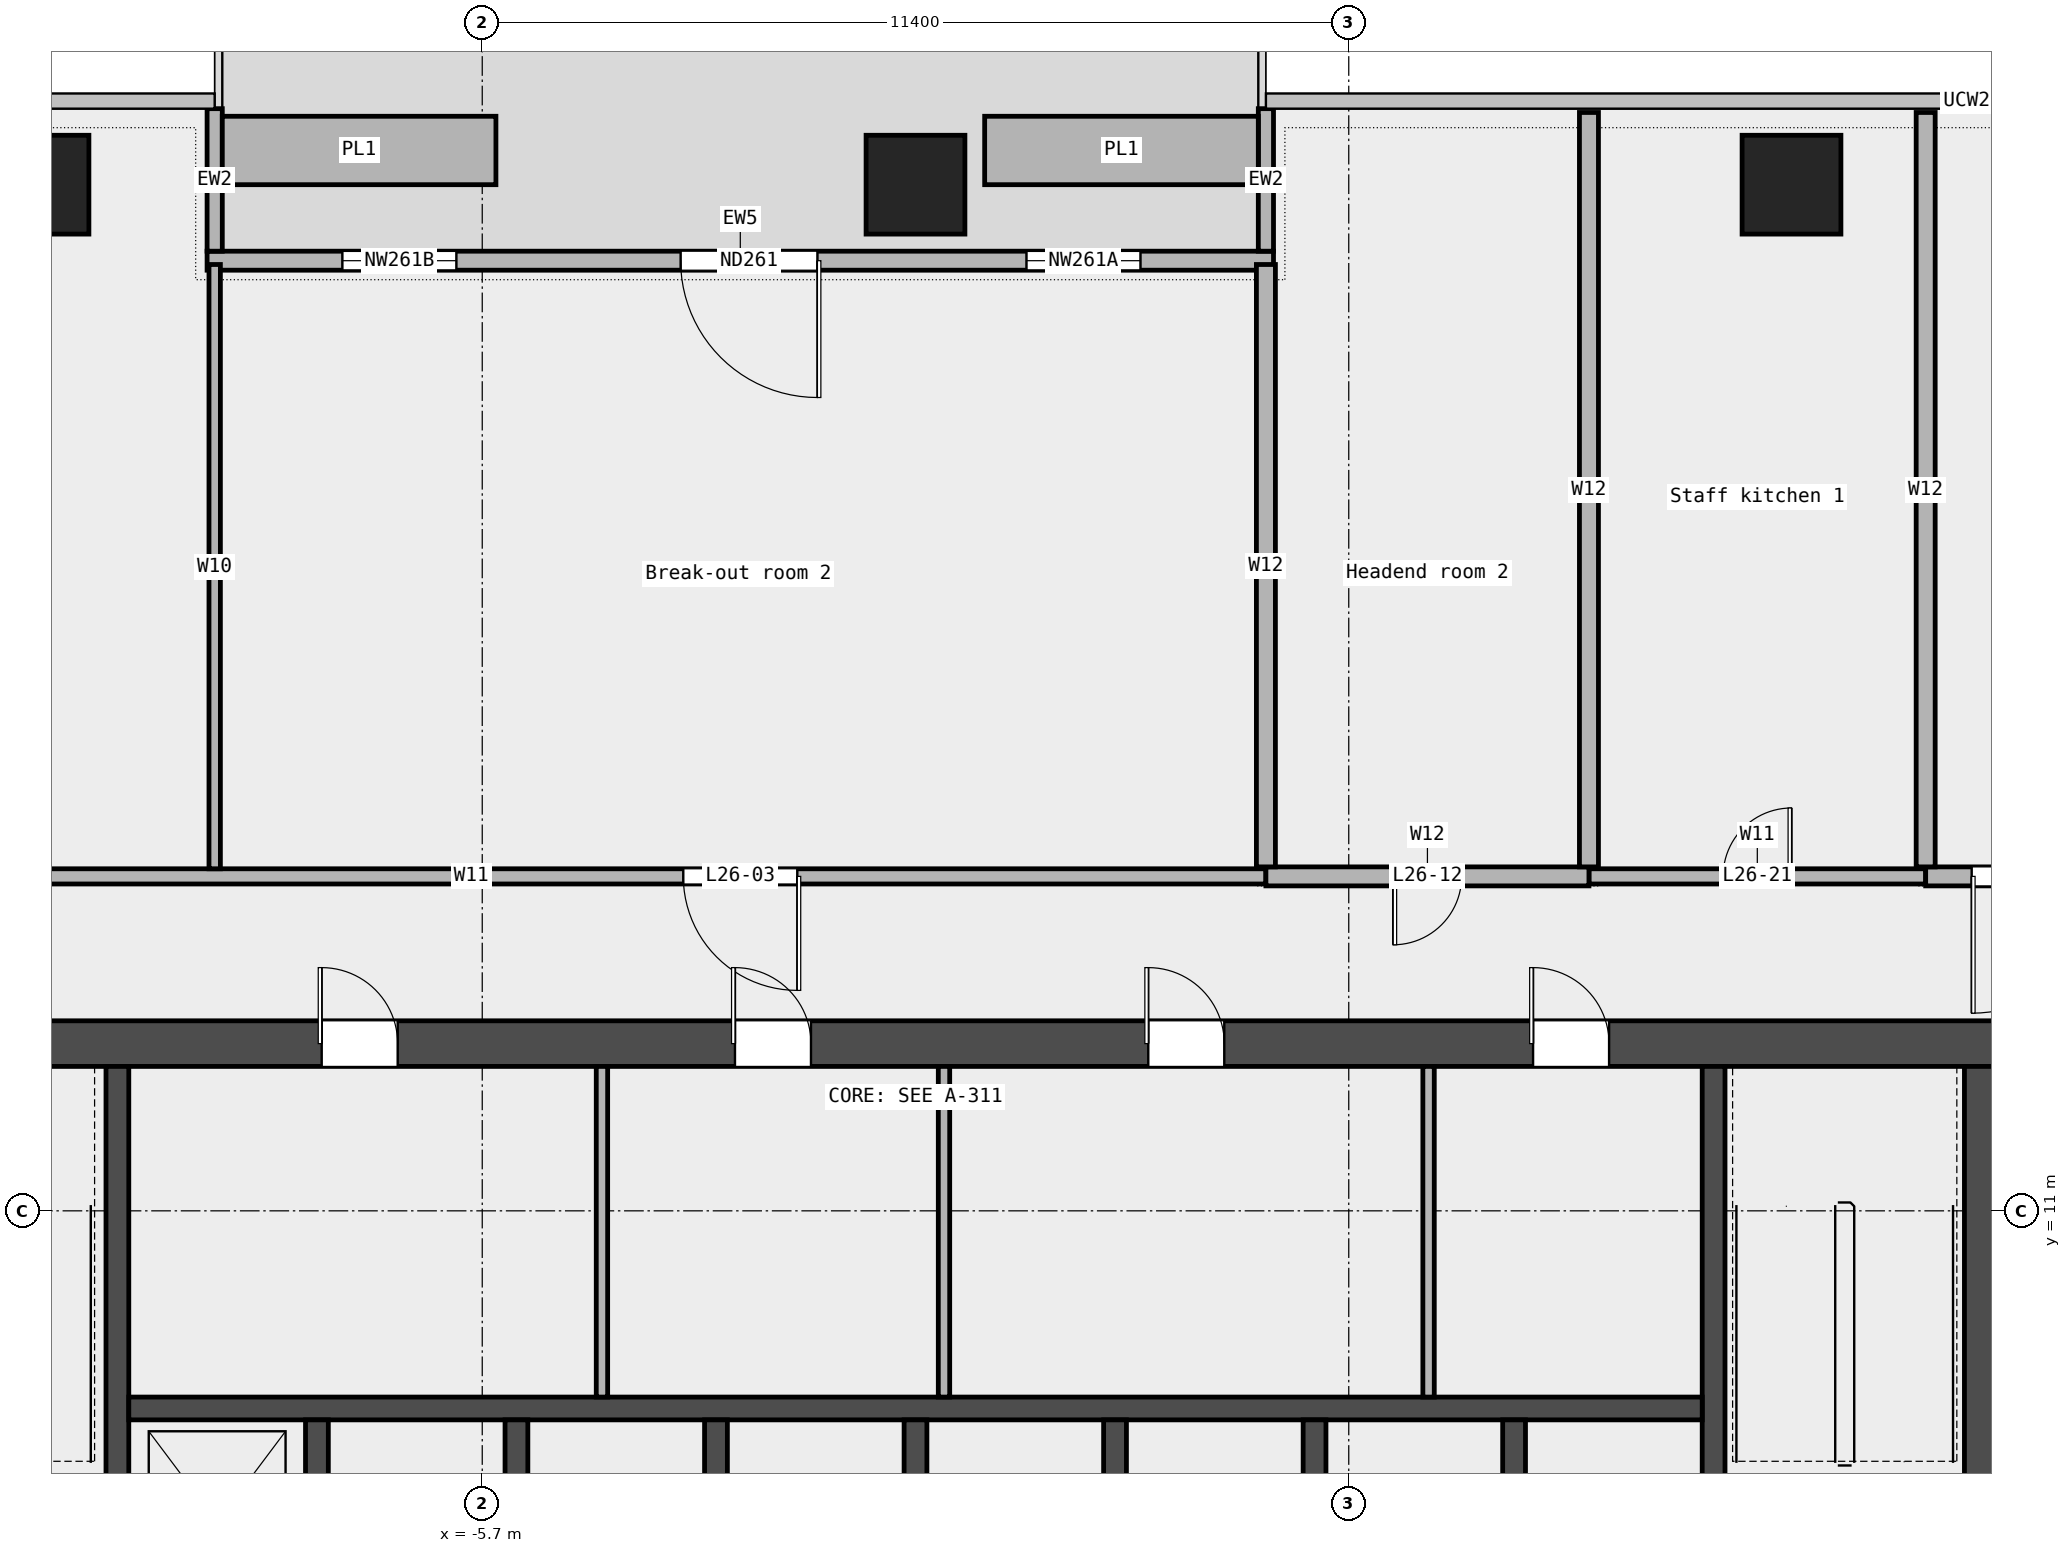
"""IFC4 building model, lengths in metres.
Left out: names, types, materials, properties, quantities, classifications, styles, units other than length and angle.
Written with IfcOpenShell. Run it as: python <this file> out.ifc"""

import sys

from ifc_helpers import new_model, si_unit, direction, frame, frame_2d, origin, origin_2d, place, context, subcontext, project, spatial, rectangle, extrude, element, fill, save


model = new_model("IFC4")
c1 = context("Model", 3, precision=1e-05, world=origin(), true_north=direction((0.0, 1.0)))
c2 = subcontext(c1, "Body", "Model", "MODEL_VIEW")
j1 = project(units=[si_unit("LENGTHUNIT", "METRE"), si_unit("PLANEANGLEUNIT", "RADIAN")], contexts=[c1])
p1 = place(None, origin())
s1 = spatial("IfcSite", under=j1, at=p1, CompositionType="ELEMENT")
p2 = place(p1, origin())
s2 = spatial("IfcBuilding", under=s1, at=p2, CompositionType="ELEMENT")
p3 = place(p2, frame((0.0, 0.0, 130.6)))
s3 = spatial("IfcBuildingStorey", under=s2, at=p3, CompositionType="ELEMENT", Elevation=130.6)
for number, where, z_axis, x_axis in (
    (1, (11.525, 24.5, 0.0), (0.0, 0.0, 1.0), (1.0, 0.0, 0.0)),
    (2, (0.0, 24.5, 0.0), (0.0, 0.0, 1.0), (1.0, 0.0, 0.0)),
    (3, (-11.525, 24.5, 0.0), (0.0, 0.0, 1.0), (1.0, 0.0, 0.0)),
):
    element("IfcColumn", number, at=place(p3, frame(where, z_axis=z_axis, x_axis=x_axis)), inside=s3, PredefinedType="COLUMN", context=c2, shape_type="SweptSolid", body=[
        extrude(rectangle(XDim=1.3, YDim=1.3, at=origin_2d()), origin(), (0.0, 0.0, 1.0), 4.05),
    ])
p4 = place(p3, frame((4.71, 23.5, 0.0), z_axis=(0.0, 0.0, 1.0), x_axis=(-1.0, 0.0, 0.0)))
e4 = element("IfcWall", 4, at=p4, inside=s3, PredefinedType="STANDARD", context=c2, shape_type="SweptSolid", body=[
    extrude(rectangle(XDim=14.03, YDim=0.25, at=frame_2d((7.015, 0.0))), origin(), (0.0, 0.0, 1.0), 4.05),
])
p5 = place(p4, frame((1.75, 0.0, 0.45)))
e5 = element("IfcOpeningElement", 5, at=p5, cuts=e4, PredefinedType="OPENING", context=c2, shape_type="SweptSolid", body=[
    extrude(rectangle(XDim=1.5, YDim=3.0, at=frame_2d((0.75, 1.5))), frame((0.0, 0.137, 0.0), z_axis=(0.0, -1.0, 0.0), x_axis=(1.0, 0.0, 0.0)), (0.0, 0.0, 1.0), 0.274),
])
p6 = place(p4, frame((6.0, 0.0, 0.0)))
e6 = element("IfcOpeningElement", 6, at=p6, cuts=e4, PredefinedType="OPENING", context=c2, shape_type="SweptSolid", body=[
    extrude(rectangle(XDim=1.8, YDim=2.4, at=frame_2d((0.9, 1.2))), frame((0.0, 0.137, 0.0), z_axis=(0.0, -1.0, 0.0), x_axis=(1.0, 0.0, 0.0)), (0.0, 0.0, 1.0), 0.274),
])
p7 = place(p4, frame((10.75, 0.0, 0.45)))
e7 = element("IfcOpeningElement", 7, at=p7, cuts=e4, PredefinedType="OPENING", context=c2, shape_type="SweptSolid", body=[
    extrude(rectangle(XDim=1.5, YDim=3.0, at=frame_2d((0.75, 1.5))), frame((0.0, 0.137, 0.0), z_axis=(0.0, -1.0, 0.0), x_axis=(1.0, 0.0, 0.0)), (0.0, 0.0, 1.0), 0.274),
])
for number, where, z_axis, x_axis in (
    (8, (4.61, 25.5, 0.0), (0.0, 0.0, 1.0), (0.0, -1.0, 0.0)),
    (9, (-9.22, 25.5, 0.0), (0.0, 0.0, 1.0), (0.0, -1.0, 0.0)),
):
    element("IfcWall", number, at=place(p3, frame(where, z_axis=z_axis, x_axis=x_axis)), inside=s3, PredefinedType="STANDARD", context=c2, shape_type="SweptSolid", body=[
        extrude(rectangle(XDim=1.875, YDim=0.2, at=frame_2d((0.938, 0.0))), origin(), (0.0, 0.0, 1.0), 4.05),
    ])
for number, where, z_axis, x_axis in (
    (10, (4.51, 24.95, 0.0), (0.0, 0.0, 1.0), (-1.0, 0.0, 0.0)),
    (11, (-5.52, 24.95, 0.0), (0.0, 0.0, 1.0), (-1.0, 0.0, 0.0)),
):
    element("IfcWall", number, at=place(p3, frame(where, z_axis=z_axis, x_axis=x_axis)), inside=s3, PredefinedType="STANDARD", context=c2, shape_type="SweptSolid", body=[
        extrude(rectangle(XDim=3.6, YDim=0.9, at=frame_2d((1.8, 0.0))), origin(), (0.0, 0.0, 1.0), 0.7),
    ])
p8 = place(p3, frame((-16.3, 15.4, 0.0), z_axis=(0.0, 0.0, 1.0), x_axis=(1.0, 0.0, 0.0)))
e12 = element("IfcWall", 12, at=p8, inside=s3, PredefinedType="PARTITIONING", context=c2, shape_type="SweptSolid", body=[
    extrude(rectangle(XDim=20.91, YDim=0.2, at=frame_2d((10.455, 0.0))), origin(), (0.0, 0.0, 1.0), 4.05),
])
p9 = place(p8, frame((13.245, 0.0, 0.0)))
e13 = element("IfcOpeningElement", 13, at=p9, cuts=e12, PredefinedType="OPENING", context=c2, shape_type="SweptSolid", body=[
    extrude(rectangle(XDim=1.5, YDim=2.1, at=frame_2d((0.75, 1.05))), frame((0.0, 0.112, 0.0), z_axis=(0.0, -1.0, 0.0), x_axis=(1.0, 0.0, 0.0)), (0.0, 0.0, 1.0), 0.224),
])
p10 = place(p8, frame((2.387, 0.0, 0.0)))
e14 = element("IfcOpeningElement", 14, at=p10, cuts=e12, PredefinedType="OPENING", context=c2, shape_type="SweptSolid", body=[
    extrude(rectangle(XDim=1.2, YDim=2.1, at=frame_2d((0.6, 1.05))), frame((0.0, 0.112, 0.0), z_axis=(0.0, -1.0, 0.0), x_axis=(1.0, 0.0, 0.0)), (0.0, 0.0, 1.0), 0.224),
])
p11 = place(p3, frame((8.86, 15.4, 0.0), z_axis=(0.0, 0.0, 1.0), x_axis=(1.0, 0.0, 0.0)))
e15 = element("IfcWall", 15, at=p11, inside=s3, PredefinedType="PARTITIONING", context=c2, shape_type="SweptSolid", body=[
    extrude(rectangle(XDim=4.43, YDim=0.2, at=frame_2d((2.215, 0.0))), origin(), (0.0, 0.0, 1.0), 4.05),
])
p12 = place(p11, frame((1.765, 0.0, 0.0)))
e16 = element("IfcOpeningElement", 16, at=p12, cuts=e15, PredefinedType="OPENING", context=c2, shape_type="SweptSolid", body=[
    extrude(rectangle(XDim=0.9, YDim=2.1, at=frame_2d((0.45, 1.05))), frame((0.0, 0.112, 0.0), z_axis=(0.0, -1.0, 0.0), x_axis=(1.0, 0.0, 0.0)), (0.0, 0.0, 1.0), 0.224),
])
p13 = place(p3, frame((4.61, 15.4, 0.0), z_axis=(0.0, 0.0, 1.0), x_axis=(1.0, 0.0, 0.0)))
e17 = element("IfcWall", 17, at=p13, inside=s3, PredefinedType="PARTITIONING", context=c2, shape_type="SweptSolid", body=[
    extrude(rectangle(XDim=4.25, YDim=0.25, at=frame_2d((2.125, 0.0))), origin(), (0.0, 0.0, 1.0), 4.05),
])
p14 = place(p13, frame((1.675, 0.0, 0.0)))
e18 = element("IfcOpeningElement", 18, at=p14, cuts=e17, PredefinedType="OPENING", context=c2, shape_type="SweptSolid", body=[
    extrude(rectangle(XDim=0.9, YDim=2.1, at=frame_2d((0.45, 1.05))), frame((0.0, 0.137, 0.0), z_axis=(0.0, -1.0, 0.0), x_axis=(1.0, 0.0, 0.0)), (0.0, 0.0, 1.0), 0.274),
])
p15 = place(p3, frame((13.29, 15.4, 0.0), z_axis=(0.0, 0.0, 1.0), x_axis=(1.0, 0.0, 0.0)))
e19 = element("IfcWall", 19, at=p15, inside=s3, PredefinedType="PARTITIONING", context=c2, shape_type="SweptSolid", body=[
    extrude(rectangle(XDim=3.01, YDim=0.25, at=frame_2d((1.505, 0.0))), origin(), (0.0, 0.0, 1.0), 4.05),
])
p16 = place(p15, frame((0.605, 0.0, 0.0)))
e20 = element("IfcOpeningElement", 20, at=p16, cuts=e19, PredefinedType="OPENING", context=c2, shape_type="SweptSolid", body=[
    extrude(rectangle(XDim=1.8, YDim=2.1, at=frame_2d((0.9, 1.05))), frame((0.0, 0.137, 0.0), z_axis=(0.0, -1.0, 0.0), x_axis=(1.0, 0.0, 0.0)), (0.0, 0.0, 1.0), 0.274),
])
p17 = place(p3, frame((-9.22, 15.5, 0.0), z_axis=(0.0, 0.0, 1.0), x_axis=(0.0, 1.0, 0.0)))
e21 = element("IfcWall", 21, at=p17, inside=s3, PredefinedType="PARTITIONING", context=c2, shape_type="SweptSolid", body=[
    extrude(rectangle(XDim=7.95, YDim=0.15, at=frame_2d((3.975, 0.0))), origin(), (0.0, 0.0, 1.0), 4.05),
])
p18 = place(p3, frame((4.61, 15.525, 0.0), z_axis=(0.0, 0.0, 1.0), x_axis=(0.0, 1.0, 0.0)))
e22 = element("IfcWall", 22, at=p18, inside=s3, PredefinedType="PARTITIONING", context=c2, shape_type="SweptSolid", body=[
    extrude(rectangle(XDim=7.925, YDim=0.25, at=frame_2d((3.962, 0.0))), origin(), (0.0, 0.0, 1.0), 4.05),
])
for number, where, z_axis, x_axis in (
    (23, (8.86, 15.525, 0.0), (0.0, 0.0, 1.0), (0.0, 1.0, 0.0)),
    (24, (13.29, 15.525, 0.0), (0.0, 0.0, 1.0), (0.0, 1.0, 0.0)),
):
    element("IfcWall", number, at=place(p3, frame(where, z_axis=z_axis, x_axis=x_axis)), inside=s3, PredefinedType="PARTITIONING", context=c2, shape_type="SweptSolid", body=[
        extrude(rectangle(XDim=9.925, YDim=0.25, at=frame_2d((4.962, 0.0))), origin(), (0.0, 0.0, 1.0), 4.05),
    ])
p19 = place(p3, frame((-14.4, 13.2, 0.0), z_axis=(0.0, 0.0, 1.0), x_axis=(1.0, 0.0, 0.0)))
e25 = element("IfcWall", 25, at=p19, inside=s3, PredefinedType="SHEAR", context=c2, shape_type="SweptSolid", body=[
    extrude(rectangle(XDim=28.8, YDim=0.6, at=frame_2d((14.4, 0.0))), origin(), (0.0, 0.0, 1.0), 4.2),
])
p20 = place(p19, frame((6.587, 0.0, 0.0)))
e26 = element("IfcOpeningElement", 26, at=p20, cuts=e25, PredefinedType="OPENING", context=c2, shape_type="SweptSolid", body=[
    extrude(rectangle(XDim=1.0, YDim=2.1, at=frame_2d((0.5, 1.05))), frame((0.0, 0.312, 0.0), z_axis=(0.0, -1.0, 0.0), x_axis=(1.0, 0.0, 0.0)), (0.0, 0.0, 1.0), 0.624),
])
p21 = place(p19, frame((12.025, 0.0, 0.0)))
e27 = element("IfcOpeningElement", 27, at=p21, cuts=e25, PredefinedType="OPENING", context=c2, shape_type="SweptSolid", body=[
    extrude(rectangle(XDim=1.0, YDim=2.1, at=frame_2d((0.5, 1.05))), frame((0.0, 0.312, 0.0), z_axis=(0.0, -1.0, 0.0), x_axis=(1.0, 0.0, 0.0)), (0.0, 0.0, 1.0), 0.624),
])
p22 = place(p19, frame((17.462, 0.0, 0.0)))
e28 = element("IfcOpeningElement", 28, at=p22, cuts=e25, PredefinedType="OPENING", context=c2, shape_type="SweptSolid", body=[
    extrude(rectangle(XDim=1.0, YDim=2.1, at=frame_2d((0.5, 1.05))), frame((0.0, 0.312, 0.0), z_axis=(0.0, -1.0, 0.0), x_axis=(1.0, 0.0, 0.0)), (0.0, 0.0, 1.0), 0.624),
])
p23 = place(p19, frame((22.525, 0.0, 0.0)))
e29 = element("IfcOpeningElement", 29, at=p23, cuts=e25, PredefinedType="OPENING", context=c2, shape_type="SweptSolid", body=[
    extrude(rectangle(XDim=1.0, YDim=2.1, at=frame_2d((0.5, 1.05))), frame((0.0, 0.312, 0.0), z_axis=(0.0, -1.0, 0.0), x_axis=(1.0, 0.0, 0.0)), (0.0, 0.0, 1.0), 0.624),
])
p24 = place(p3, frame((14.1, -6.6, 0.0), z_axis=(0.0, 0.0, 1.0), x_axis=(0.0, 1.0, 0.0)))
e30 = element("IfcWall", 30, at=p24, inside=s3, PredefinedType="SHEAR", context=c2, shape_type="SweptSolid", body=[
    extrude(rectangle(XDim=19.5, YDim=0.6, at=frame_2d((9.75, 0.0))), origin(), (0.0, 0.0, 1.0), 4.2),
])
p25 = place(p24, frame((9.3, 0.0, 0.0)))
e31 = element("IfcOpeningElement", 31, at=p25, cuts=e30, PredefinedType="OPENING", context=c2, shape_type="SweptSolid", body=[
    extrude(rectangle(XDim=1.8, YDim=2.1, at=frame_2d((0.9, 1.05))), frame((0.0, 0.312, 0.0), z_axis=(0.0, -1.0, 0.0), x_axis=(1.0, 0.0, 0.0)), (0.0, 0.0, 1.0), 0.624),
])
for number, where, z_axis, x_axis in (
    (32, (-10.5, 5.25, 0.0), (0.0, 0.0, 1.0), (0.0, 1.0, 0.0)),
    (33, (10.5, 5.25, 0.0), (0.0, 0.0, 1.0), (0.0, 1.0, 0.0)),
):
    element("IfcWall", number, at=place(p3, frame(where, z_axis=z_axis, x_axis=x_axis)), inside=s3, PredefinedType="SHEAR", context=c2, shape_type="SweptSolid", body=[
        extrude(rectangle(XDim=7.65, YDim=0.3, at=frame_2d((3.825, 0.0))), origin(), (0.0, 0.0, 1.0), 4.2),
    ])
p26 = place(p3, frame((-10.35, 8.4, 0.0), z_axis=(0.0, 0.0, 1.0), x_axis=(1.0, 0.0, 0.0)))
e34 = element("IfcWall", 34, at=p26, inside=s3, PredefinedType="SOLIDWALL", context=c2, shape_type="SweptSolid", body=[
    extrude(rectangle(XDim=20.7, YDim=0.3, at=frame_2d((10.35, 0.0))), origin(), (0.0, 0.0, 1.0), 4.2),
])
for number, where, z_axis, x_axis in (
    (35, (-7.875, 5.55, 0.0), (0.0, 0.0, 1.0), (0.0, 1.0, 0.0)),
    (36, (-5.25, 5.55, 0.0), (0.0, 0.0, 1.0), (0.0, 1.0, 0.0)),
    (37, (-2.625, 5.55, 0.0), (0.0, 0.0, 1.0), (0.0, 1.0, 0.0)),
    (38, (0.0, 5.55, 0.0), (0.0, 0.0, 1.0), (0.0, 1.0, 0.0)),
    (39, (2.625, 5.55, 0.0), (0.0, 0.0, 1.0), (0.0, 1.0, 0.0)),
    (40, (5.25, 5.55, 0.0), (0.0, 0.0, 1.0), (0.0, 1.0, 0.0)),
    (41, (7.875, 5.55, 0.0), (0.0, 0.0, 1.0), (0.0, 1.0, 0.0)),
):
    element("IfcWall", number, at=place(p3, frame(where, z_axis=z_axis, x_axis=x_axis)), inside=s3, PredefinedType="SOLIDWALL", context=c2, shape_type="SweptSolid", body=[
        extrude(rectangle(XDim=2.7, YDim=0.3, at=frame_2d((1.35, 0.0))), origin(), (0.0, 0.0, 1.0), 4.2),
    ])
for number, where, z_axis, x_axis in (
    (42, (-4.125, 8.55, 0.0), (0.0, 0.0, 1.0), (0.0, 1.0, 0.0)),
    (43, (0.375, 8.55, 0.0), (0.0, 0.0, 1.0), (0.0, 1.0, 0.0)),
    (44, (6.75, 8.55, 0.0), (0.0, 0.0, 1.0), (0.0, 1.0, 0.0)),
):
    element("IfcWall", number, at=place(p3, frame(where, z_axis=z_axis, x_axis=x_axis)), inside=s3, PredefinedType="PARTITIONING", context=c2, shape_type="SweptSolid", body=[
        extrude(rectangle(XDim=4.35, YDim=0.15, at=frame_2d((2.175, 0.0))), origin(), (0.0, 0.0, 1.0), 4.2),
    ])
p27 = place(p5, origin())
e45 = element("IfcWindow", 45, at=p27, inside=s3, PartitioningType="SINGLE_PANEL", PredefinedType="WINDOW", context=c2, shape_type="SweptSolid", body=[
    extrude(rectangle(XDim=1.5, YDim=3.0, at=frame_2d((0.75, 1.5))), frame((0.0, 0.03, 0.0), z_axis=(0.0, -1.0, 0.0), x_axis=(1.0, 0.0, 0.0)), (0.0, 0.0, 1.0), 0.06),
])
fill(e5, e45)
p28 = place(p6, origin())
e46 = element("IfcDoor", 46, at=p28, inside=s3, OperationType="DOUBLE_DOOR_SINGLE_SWING", PredefinedType="DOOR", context=c2, shape_type="SweptSolid", body=[
    extrude(rectangle(XDim=1.8, YDim=2.4, at=frame_2d((0.9, 1.2))), frame((0.0, 0.025, 0.0), z_axis=(0.0, -1.0, 0.0), x_axis=(1.0, 0.0, 0.0)), (0.0, 0.0, 1.0), 0.05),
])
fill(e6, e46)
p29 = place(p7, origin())
e47 = element("IfcWindow", 47, at=p29, inside=s3, PartitioningType="SINGLE_PANEL", PredefinedType="WINDOW", context=c2, shape_type="SweptSolid", body=[
    extrude(rectangle(XDim=1.5, YDim=3.0, at=frame_2d((0.75, 1.5))), frame((0.0, 0.03, 0.0), z_axis=(0.0, -1.0, 0.0), x_axis=(1.0, 0.0, 0.0)), (0.0, 0.0, 1.0), 0.06),
])
fill(e7, e47)
p30 = place(p9, origin())
e48 = element("IfcDoor", 48, at=p30, inside=s3, OperationType="DOUBLE_DOOR_SINGLE_SWING", PredefinedType="DOOR", context=c2, shape_type="SweptSolid", body=[
    extrude(rectangle(XDim=1.5, YDim=2.1, at=frame_2d((0.75, 1.05))), frame((0.0, 0.025, 0.0), z_axis=(0.0, -1.0, 0.0), x_axis=(1.0, 0.0, 0.0)), (0.0, 0.0, 1.0), 0.05),
])
fill(e13, e48)
p31 = place(p14, origin())
e49 = element("IfcDoor", 49, at=p31, inside=s3, OperationType="SINGLE_SWING_RIGHT", PredefinedType="DOOR", context=c2, shape_type="SweptSolid", body=[
    extrude(rectangle(XDim=0.9, YDim=2.1, at=frame_2d((0.45, 1.05))), frame((0.0, 0.025, 0.0), z_axis=(0.0, -1.0, 0.0), x_axis=(1.0, 0.0, 0.0)), (0.0, 0.0, 1.0), 0.05),
])
fill(e18, e49)
p32 = place(p16, origin())
e50 = element("IfcDoor", 50, at=p32, inside=s3, OperationType="DOUBLE_DOOR_SINGLE_SWING", PredefinedType="DOOR", context=c2, shape_type="SweptSolid", body=[
    extrude(rectangle(XDim=1.8, YDim=2.1, at=frame_2d((0.9, 1.05))), frame((0.0, 0.025, 0.0), z_axis=(0.0, -1.0, 0.0), x_axis=(1.0, 0.0, 0.0)), (0.0, 0.0, 1.0), 0.05),
])
fill(e20, e50)
p33 = place(p12, origin())
e51 = element("IfcDoor", 51, at=p33, inside=s3, OperationType="SINGLE_SWING_RIGHT", PredefinedType="DOOR", context=c2, shape_type="SweptSolid", body=[
    extrude(rectangle(XDim=0.9, YDim=2.1, at=frame_2d((0.45, 1.05))), frame((0.0, 0.025, 0.0), z_axis=(0.0, -1.0, 0.0), x_axis=(1.0, 0.0, 0.0)), (0.0, 0.0, 1.0), 0.05),
])
fill(e16, e51)
p34 = place(p20, origin())
e52 = element("IfcDoor", 52, at=p34, inside=s3, OperationType="SINGLE_SWING_LEFT", PredefinedType="DOOR", context=c2, shape_type="SweptSolid", body=[
    extrude(rectangle(XDim=1.0, YDim=2.1, at=frame_2d((0.5, 1.05))), frame((0.0, 0.025, 0.0), z_axis=(0.0, -1.0, 0.0), x_axis=(1.0, 0.0, 0.0)), (0.0, 0.0, 1.0), 0.05),
])
fill(e26, e52)
p35 = place(p21, origin())
e53 = element("IfcDoor", 53, at=p35, inside=s3, OperationType="SINGLE_SWING_LEFT", PredefinedType="DOOR", context=c2, shape_type="SweptSolid", body=[
    extrude(rectangle(XDim=1.0, YDim=2.1, at=frame_2d((0.5, 1.05))), frame((0.0, 0.025, 0.0), z_axis=(0.0, -1.0, 0.0), x_axis=(1.0, 0.0, 0.0)), (0.0, 0.0, 1.0), 0.05),
])
fill(e27, e53)
p36 = place(p22, origin())
e54 = element("IfcDoor", 54, at=p36, inside=s3, OperationType="SINGLE_SWING_LEFT", PredefinedType="DOOR", context=c2, shape_type="SweptSolid", body=[
    extrude(rectangle(XDim=1.0, YDim=2.1, at=frame_2d((0.5, 1.05))), frame((0.0, 0.025, 0.0), z_axis=(0.0, -1.0, 0.0), x_axis=(1.0, 0.0, 0.0)), (0.0, 0.0, 1.0), 0.05),
])
fill(e28, e54)
p37 = place(p23, origin())
e55 = element("IfcDoor", 55, at=p37, inside=s3, OperationType="SINGLE_SWING_LEFT", PredefinedType="DOOR", context=c2, shape_type="SweptSolid", body=[
    extrude(rectangle(XDim=1.0, YDim=2.1, at=frame_2d((0.5, 1.05))), frame((0.0, 0.025, 0.0), z_axis=(0.0, -1.0, 0.0), x_axis=(1.0, 0.0, 0.0)), (0.0, 0.0, 1.0), 0.05),
])
fill(e29, e55)
save(model, sys.argv[1])
